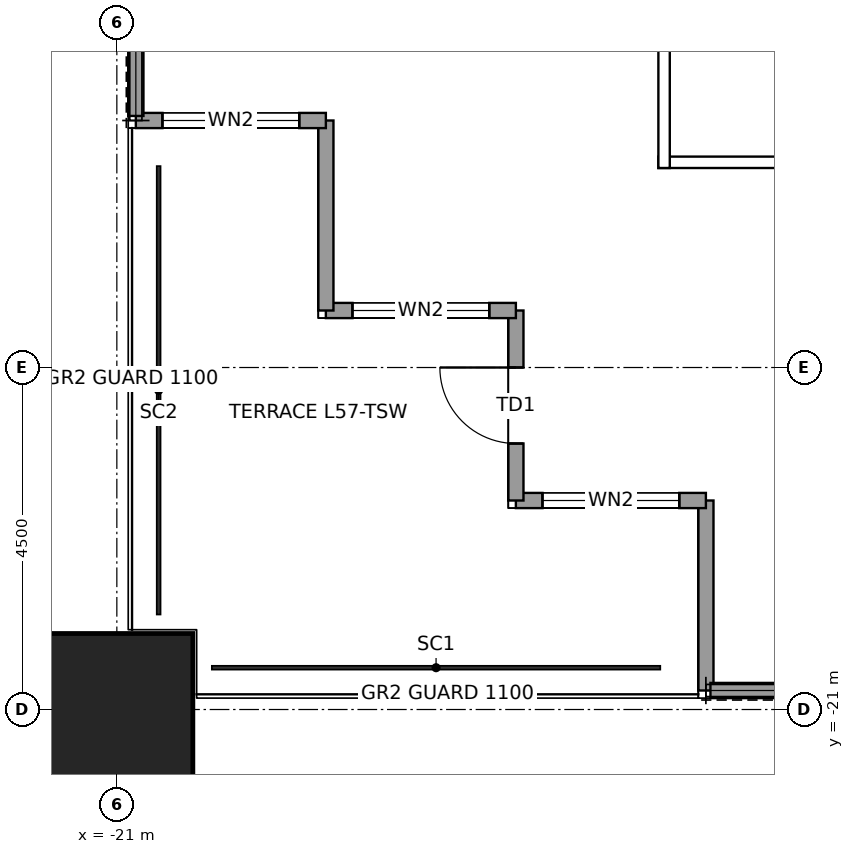
"""IFC4 building model, lengths in metres.
Left out: names, types, materials, properties, quantities, classifications, styles, units other than length and angle.
Written with IfcOpenShell. Run it as: python <this file> out.ifc"""

import sys

from ifc_helpers import new_model, si_unit, direction, frame, frame_2d, origin, origin_2d, place, context, subcontext, project, spatial, rectangle, hollow_rectangle, extrude, element, fill, save


model = new_model("IFC4")
c1 = context("Model", 3, precision=1e-05, world=origin(), true_north=direction((0.0, 1.0)))
c2 = subcontext(c1, "Body", "Model", "MODEL_VIEW")
j1 = project(units=[si_unit("LENGTHUNIT", "METRE"), si_unit("PLANEANGLEUNIT", "RADIAN")], contexts=[c1])
p1 = place(None, origin())
s1 = spatial("IfcSite", under=j1, at=p1, CompositionType="ELEMENT")
p2 = place(p1, origin())
s2 = spatial("IfcBuilding", under=s1, at=p2, CompositionType="ELEMENT")
p3 = place(p2, frame((0.0, 0.0, 263.9)))
s3 = spatial("IfcBuildingStorey", under=s2, at=p3, CompositionType="ELEMENT", Elevation=263.9)
p4 = place(p3, frame((-21.0, -21.0, 0.0), z_axis=(0.0, 0.0, 1.0), x_axis=(1.0, 0.0, 0.0)))
e1 = element("IfcColumn", 1, at=p4, inside=s3, PredefinedType="COLUMN", context=c2, shape_type="SweptSolid", body=[
    extrude(hollow_rectangle(XDim=2.0, YDim=2.0, WallThickness=0.095, at=origin_2d()), origin(), (0.0, 0.0, 1.0), 4.0),
])
p5 = place(p3, frame((-13.25, -20.75, 0.0), z_axis=(0.0, 0.0, 1.0), x_axis=(0.0, 1.0, 0.0)))
e2 = element("IfcWall", 2, at=p5, inside=s3, PredefinedType="SOLIDWALL", context=c2, shape_type="SweptSolid", body=[
    extrude(rectangle(XDim=2.5, YDim=0.2, at=frame_2d((1.25, 0.0))), origin(), (0.0, 0.0, 1.0), 3.85),
])
p6 = place(p3, frame((-13.25, -18.25, 0.0), z_axis=(0.0, 0.0, 1.0), x_axis=(-1.0, 0.0, 0.0)))
e3 = element("IfcWall", 3, at=p6, inside=s3, PredefinedType="SOLIDWALL", context=c2, shape_type="SweptSolid", body=[
    extrude(rectangle(XDim=2.5, YDim=0.2, at=frame_2d((1.25, 0.0))), origin(), (0.0, 0.0, 1.0), 3.85),
])
p7 = place(p6, frame((0.35, 0.0, 0.3)))
e4 = element("IfcOpeningElement", 4, at=p7, cuts=e3, PredefinedType="OPENING", context=c2, shape_type="SweptSolid", body=[
    extrude(rectangle(XDim=1.8, YDim=2.4, at=frame_2d((0.9, 1.2))), frame((0.0, 0.11, 0.0), z_axis=(0.0, -1.0, 0.0), x_axis=(1.0, 0.0, 0.0)), (0.0, 0.0, 1.0), 0.22),
])
p8 = place(p3, frame((-15.75, -18.25, 0.0), z_axis=(0.0, 0.0, 1.0), x_axis=(0.0, 1.0, 0.0)))
e5 = element("IfcWall", 5, at=p8, inside=s3, PredefinedType="SOLIDWALL", context=c2, shape_type="SweptSolid", body=[
    extrude(rectangle(XDim=2.5, YDim=0.2, at=frame_2d((1.25, 0.0))), origin(), (0.0, 0.0, 1.0), 3.317),
])
p9 = place(p8, frame((0.75, 0.0, 0.0)))
e6 = element("IfcOpeningElement", 6, at=p9, cuts=e5, PredefinedType="OPENING", context=c2, shape_type="SweptSolid", body=[
    extrude(rectangle(XDim=1.0, YDim=2.4, at=frame_2d((0.5, 1.2))), frame((0.0, 0.11, 0.0), z_axis=(0.0, -1.0, 0.0), x_axis=(1.0, 0.0, 0.0)), (0.0, 0.0, 1.0), 0.22),
])
p10 = place(p3, frame((-15.75, -15.75, 0.0), z_axis=(0.0, 0.0, 1.0), x_axis=(-1.0, 0.0, 0.0)))
e7 = element("IfcWall", 7, at=p10, inside=s3, PredefinedType="SOLIDWALL", context=c2, shape_type="SweptSolid", body=[
    extrude(rectangle(XDim=2.5, YDim=0.2, at=frame_2d((1.25, 0.0))), origin(), (0.0, 0.0, 1.0), 3.85),
])
p11 = place(p10, frame((0.35, 0.0, 0.3)))
e8 = element("IfcOpeningElement", 8, at=p11, cuts=e7, PredefinedType="OPENING", context=c2, shape_type="SweptSolid", body=[
    extrude(rectangle(XDim=1.8, YDim=2.4, at=frame_2d((0.9, 1.2))), frame((0.0, 0.11, 0.0), z_axis=(0.0, -1.0, 0.0), x_axis=(1.0, 0.0, 0.0)), (0.0, 0.0, 1.0), 0.22),
])
p12 = place(p3, frame((-18.25, -15.75, 0.0), z_axis=(0.0, 0.0, 1.0), x_axis=(0.0, 1.0, 0.0)))
e9 = element("IfcWall", 9, at=p12, inside=s3, PredefinedType="SOLIDWALL", context=c2, shape_type="SweptSolid", body=[
    extrude(rectangle(XDim=2.5, YDim=0.2, at=frame_2d((1.25, 0.0))), origin(), (0.0, 0.0, 1.0), 3.85),
])
p13 = place(p3, frame((-18.25, -13.25, 0.0), z_axis=(0.0, 0.0, 1.0), x_axis=(-1.0, 0.0, 0.0)))
e10 = element("IfcWall", 10, at=p13, inside=s3, PredefinedType="SOLIDWALL", context=c2, shape_type="SweptSolid", body=[
    extrude(rectangle(XDim=2.5, YDim=0.2, at=frame_2d((1.25, 0.0))), origin(), (0.0, 0.0, 1.0), 3.85),
])
p14 = place(p13, frame((0.35, 0.0, 0.3)))
e11 = element("IfcOpeningElement", 11, at=p14, cuts=e10, PredefinedType="OPENING", context=c2, shape_type="SweptSolid", body=[
    extrude(rectangle(XDim=1.8, YDim=2.4, at=frame_2d((0.9, 1.2))), frame((0.0, 0.11, 0.0), z_axis=(0.0, -1.0, 0.0), x_axis=(1.0, 0.0, 0.0)), (0.0, 0.0, 1.0), 0.22),
])
for number, where, z_axis, x_axis in (
    (12, (-10.435, -20.75, 0.0), (0.0, 0.0, 1.0), (-1.0, 0.0, 0.0)),
    (13, (-20.75, -13.19, 0.0), (0.0, 0.0, 1.0), (0.0, 1.0, 0.0)),
):
    element("IfcWall", number, at=place(p3, frame(where, z_axis=z_axis, x_axis=x_axis)), inside=s3, PredefinedType="SOLIDWALL", context=c2, shape_type="SweptSolid", body=[
        extrude(rectangle(XDim=2.755, YDim=0.2, at=frame_2d((1.377, 0.0))), origin(), (0.0, 0.0, 1.0), 3.85),
    ])
p15 = place(p3, frame((-13.875, -13.8, 0.0), z_axis=(0.0, 0.0, 1.0), x_axis=(1.0, 0.0, 0.0)))
e14 = element("IfcWall", 14, at=p15, inside=s3, PredefinedType="PARTITIONING", context=c2, shape_type="SweptSolid", body=[
    extrude(rectangle(XDim=27.75, YDim=0.15, at=frame_2d((13.875, 0.0))), origin(), (0.0, 0.0, 1.0), 3.85),
])
p16 = place(p15, frame((3.975, 0.0, 0.0)))
e15 = element("IfcOpeningElement", 15, at=p16, cuts=e14, PredefinedType="OPENING", context=c2, shape_type="SweptSolid", body=[
    extrude(rectangle(XDim=1.0, YDim=2.4, at=frame_2d((0.5, 1.2))), frame((0.0, 0.085, 0.0), z_axis=(0.0, -1.0, 0.0), x_axis=(1.0, 0.0, 0.0)), (0.0, 0.0, 1.0), 0.17),
])
p17 = place(p3, frame((-13.8, -13.875, 0.0), z_axis=(0.0, 0.0, 1.0), x_axis=(0.0, 1.0, 0.0)))
e16 = element("IfcWall", 16, at=p17, inside=s3, PredefinedType="PARTITIONING", context=c2, shape_type="SweptSolid", body=[
    extrude(rectangle(XDim=27.75, YDim=0.15, at=frame_2d((13.875, 0.0))), origin(), (0.0, 0.0, 1.0), 3.85),
])
p18 = place(p7, origin())
e17 = element("IfcWindow", 17, at=p18, inside=s3, PartitioningType="SINGLE_PANEL", PredefinedType="WINDOW", context=c2, shape_type="SweptSolid", body=[
    extrude(rectangle(XDim=1.8, YDim=2.4, at=frame_2d((0.9, 1.2))), frame((0.0, 0.03, 0.0), z_axis=(0.0, -1.0, 0.0), x_axis=(1.0, 0.0, 0.0)), (0.0, 0.0, 1.0), 0.06),
])
fill(e4, e17)
p19 = place(p9, origin())
e18 = element("IfcDoor", 18, at=p19, inside=s3, OperationType="SINGLE_SWING_RIGHT", PredefinedType="DOOR", context=c2, shape_type="SweptSolid", body=[
    extrude(rectangle(XDim=1.0, YDim=2.4, at=frame_2d((0.5, 1.2))), frame((0.0, 0.025, 0.0), z_axis=(0.0, -1.0, 0.0), x_axis=(1.0, 0.0, 0.0)), (0.0, 0.0, 1.0), 0.05),
])
fill(e6, e18)
p20 = place(p11, origin())
e19 = element("IfcWindow", 19, at=p20, inside=s3, PartitioningType="SINGLE_PANEL", PredefinedType="WINDOW", context=c2, shape_type="SweptSolid", body=[
    extrude(rectangle(XDim=1.8, YDim=2.4, at=frame_2d((0.9, 1.2))), frame((0.0, 0.03, 0.0), z_axis=(0.0, -1.0, 0.0), x_axis=(1.0, 0.0, 0.0)), (0.0, 0.0, 1.0), 0.06),
])
fill(e8, e19)
p21 = place(p14, origin())
e20 = element("IfcWindow", 20, at=p21, inside=s3, PartitioningType="SINGLE_PANEL", PredefinedType="WINDOW", context=c2, shape_type="SweptSolid", body=[
    extrude(rectangle(XDim=1.8, YDim=2.4, at=frame_2d((0.9, 1.2))), frame((0.0, 0.03, 0.0), z_axis=(0.0, -1.0, 0.0), x_axis=(1.0, 0.0, 0.0)), (0.0, 0.0, 1.0), 0.06),
])
fill(e11, e20)
save(model, sys.argv[1])
